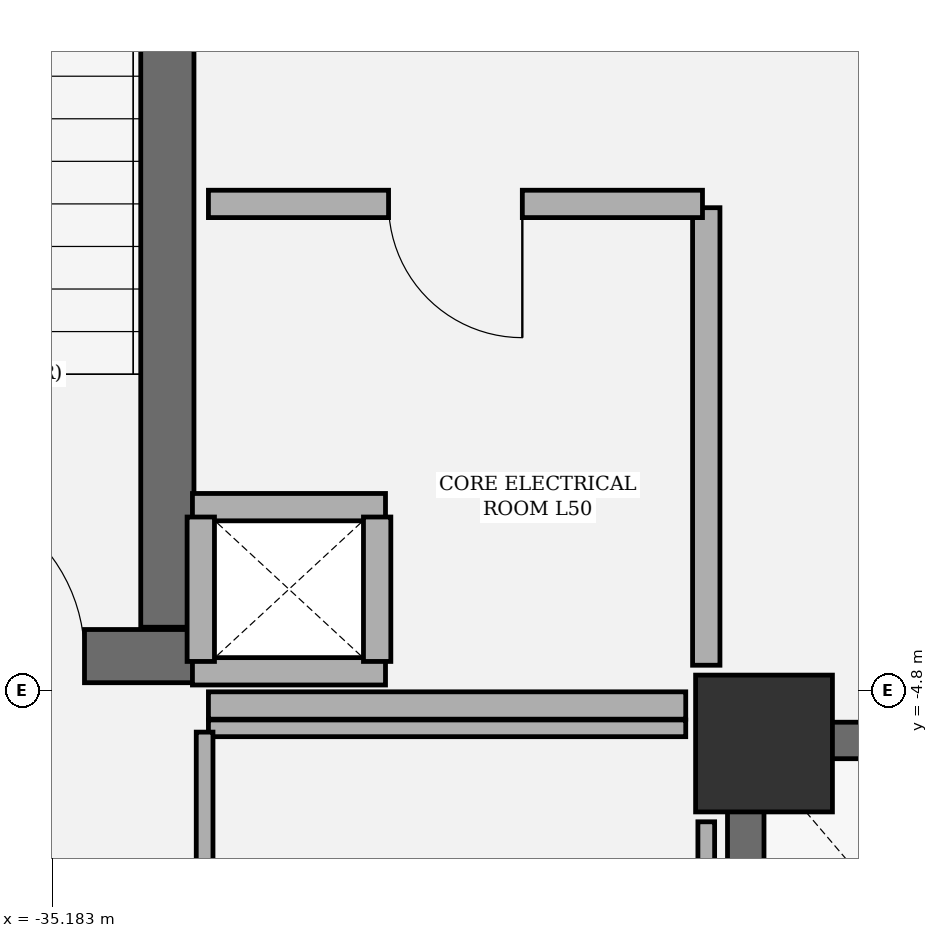
"""IFC4 building model, lengths in metres.
Left out: names, types, materials, properties, quantities, classifications, styles, units other than length and angle.
Written with IfcOpenShell. Run it as: python <this file> out.ifc"""

import sys

from ifc_helpers import new_model, si_unit, direction, frame, frame_2d, origin, origin_2d, place, context, subcontext, project, spatial, rectangle, extrude, element, fill, save


model = new_model("IFC4")
c1 = context("Model", 3, precision=1e-05, world=origin(), true_north=direction((0.0, 1.0)))
c2 = subcontext(c1, "Body", "Model", "MODEL_VIEW")
j1 = project(units=[si_unit("LENGTHUNIT", "METRE"), si_unit("PLANEANGLEUNIT", "RADIAN")], contexts=[c1])
p1 = place(None, origin())
s1 = spatial("IfcSite", under=j1, at=p1, CompositionType="ELEMENT")
p2 = place(p1, origin())
s2 = spatial("IfcBuilding", under=s1, at=p2, CompositionType="ELEMENT")
p3 = place(p2, frame((0.0, 0.0, 217.2)))
s3 = spatial("IfcBuildingStorey", under=s2, at=p3, CompositionType="ELEMENT", Elevation=217.2)
p4 = place(p3, frame((-30.5, -5.15, 0.0), z_axis=(0.0, 0.0, 1.0), x_axis=(1.0, 0.0, 0.0)))
e1 = element("IfcColumn", 1, at=p4, inside=s3, PredefinedType="COLUMN", context=c2, shape_type="SweptSolid", body=[
    extrude(rectangle(XDim=0.9, YDim=0.9, at=origin_2d()), origin(), (0.0, 0.0, 1.0), 4.05),
])
p5 = place(p3, frame((-38.46, -4.575, 0.0), z_axis=(0.0, 0.0, 1.0), x_axis=(1.0, 0.0, 0.0)))
e2 = element("IfcWall", 2, at=p5, inside=s3, PredefinedType="SHEAR", context=c2, shape_type="SweptSolid", body=[
    extrude(rectangle(XDim=4.21, YDim=0.35, at=frame_2d((2.105, 0.0))), origin(), (0.0, 0.0, 1.0), 3.78),
])
p6 = place(p5, frame((2.39, 0.0, 0.0)))
e3 = element("IfcOpeningElement", 3, at=p6, cuts=e2, PredefinedType="OPENING", context=c2, shape_type="SweptSolid", body=[
    extrude(rectangle(XDim=1.1, YDim=2.2, at=frame_2d((0.55, 1.1))), frame((0.0, 0.185, 0.0), z_axis=(0.0, -1.0, 0.0), x_axis=(1.0, 0.0, 0.0)), (0.0, 0.0, 1.0), 0.37),
])
p7 = place(p3, frame((-34.425, -4.385, 0.0), z_axis=(0.0, 0.0, 1.0), x_axis=(0.0, 1.0, 0.0)))
e4 = element("IfcWall", 4, at=p7, inside=s3, PredefinedType="SHEAR", context=c2, shape_type="SweptSolid", body=[
    extrude(rectangle(XDim=8.77, YDim=0.35, at=frame_2d((4.385, 0.0))), origin(), (0.0, 0.0, 1.0), 3.78),
])
p8 = place(p3, frame((-30.74, -5.13, 0.0), z_axis=(0.0, 0.0, 1.0), x_axis=(1.0, 0.0, 0.0)))
e5 = element("IfcWall", 5, at=p8, inside=s3, PredefinedType="SHEAR", context=c2, shape_type="SweptSolid", body=[
    extrude(rectangle(XDim=2.48, YDim=0.24, at=frame_2d((1.24, 0.0))), origin(), (0.0, 0.0, 1.0), 3.78),
])
p9 = place(p3, frame((-30.62, -7.638, 0.0), z_axis=(0.0, 0.0, 1.0), x_axis=(0.0, 1.0, 0.0)))
e6 = element("IfcWall", 6, at=p9, inside=s3, PredefinedType="SHEAR", context=c2, shape_type="SweptSolid", body=[
    extrude(rectangle(XDim=2.376, YDim=0.24, at=frame_2d((1.188, 0.0))), origin(), (0.0, 0.0, 1.0), 3.78),
])
for number, where, z_axis, x_axis in (
    (7, (-32.99, -4.675, 0.0), (0.0, 0.0, 1.0), (-1.0, 0.0, 0.0)),
    (8, (-34.26, -3.595, 0.0), (0.0, 0.0, 1.0), (1.0, 0.0, 0.0)),
):
    element("IfcWall", number, at=place(p3, frame(where, z_axis=z_axis, x_axis=x_axis)), inside=s3, PredefinedType="PARTITIONING", context=c2, shape_type="SweptSolid", body=[
        extrude(rectangle(XDim=1.27, YDim=0.18, at=frame_2d((0.635, 0.0))), origin(), (0.0, 0.0, 1.0), 3.78),
    ])
for number, where, z_axis, x_axis in (
    (9, (-34.205, -4.61, 0.0), (0.0, 0.0, 1.0), (0.0, 1.0, 0.0)),
    (10, (-33.045, -3.66, 0.0), (0.0, 0.0, 1.0), (0.0, -1.0, 0.0)),
):
    element("IfcWall", number, at=place(p3, frame(where, z_axis=z_axis, x_axis=x_axis)), inside=s3, PredefinedType="PARTITIONING", context=c2, shape_type="SweptSolid", body=[
        extrude(rectangle(XDim=0.95, YDim=0.18, at=frame_2d((0.475, 0.0))), origin(), (0.0, 0.0, 1.0), 3.78),
    ])
p10 = place(p3, frame((-30.88, -7.743, 0.0), z_axis=(0.0, 0.0, 1.0), x_axis=(0.0, 1.0, 0.0)))
e11 = element("IfcWall", 11, at=p10, inside=s3, PredefinedType="PARTITIONING", context=c2, shape_type="SweptSolid", body=[
    extrude(rectangle(XDim=2.078, YDim=0.11, at=frame_2d((1.039, 0.0))), origin(), (0.0, 0.0, 1.0), 3.78),
])
p11 = place(p3, frame((-31.015, -5.05, 0.0), z_axis=(0.0, 0.0, 1.0), x_axis=(-1.0, 0.0, 0.0)))
e12 = element("IfcWall", 12, at=p11, inside=s3, PredefinedType="PARTITIONING", context=c2, shape_type="SweptSolid", body=[
    extrude(rectangle(XDim=3.14, YDim=0.11, at=frame_2d((1.57, 0.0))), origin(), (0.0, 0.0, 1.0), 3.78),
])
p12 = place(p3, frame((-34.18, -5.075, 0.0), z_axis=(0.0, 0.0, 1.0), x_axis=(0.0, -1.0, 0.0)))
e13 = element("IfcWall", 13, at=p12, inside=s3, PredefinedType="PARTITIONING", context=c2, shape_type="SweptSolid", body=[
    extrude(rectangle(XDim=3.25, YDim=0.11, at=frame_2d((1.625, 0.0))), origin(), (0.0, 0.0, 1.0), 3.78),
])
p13 = place(p12, frame((1.185, 0.0, 0.0)))
e14 = element("IfcOpeningElement", 14, at=p13, cuts=e13, PredefinedType="OPENING", context=c2, shape_type="SweptSolid", body=[
    extrude(rectangle(XDim=0.88, YDim=2.1, at=frame_2d((0.44, 1.05))), frame((0.0, 0.065, 0.0), z_axis=(0.0, -1.0, 0.0), x_axis=(1.0, 0.0, 0.0)), (0.0, 0.0, 1.0), 0.13),
])
p14 = place(p3, frame((-34.155, -4.9, 0.0), z_axis=(0.0, 0.0, 1.0), x_axis=(1.0, 0.0, 0.0)))
e15 = element("IfcWall", 15, at=p14, inside=s3, PredefinedType="PARTITIONING", context=c2, shape_type="SweptSolid", body=[
    extrude(rectangle(XDim=3.14, YDim=0.18, at=frame_2d((1.57, 0.0))), origin(), (0.0, 0.0, 1.0), 3.78),
])
p15 = place(p3, frame((-30.88, -4.635, 0.0), z_axis=(0.0, 0.0, 1.0), x_axis=(0.0, 1.0, 0.0)))
e16 = element("IfcWall", 16, at=p15, inside=s3, PredefinedType="PARTITIONING", context=c2, shape_type="SweptSolid", body=[
    extrude(rectangle(XDim=3.01, YDim=0.18, at=frame_2d((1.505, 0.0))), origin(), (0.0, 0.0, 1.0), 3.78),
])
p16 = place(p3, frame((-30.905, -1.6, 0.0), z_axis=(0.0, 0.0, 1.0), x_axis=(-1.0, 0.0, 0.0)))
e17 = element("IfcWall", 17, at=p16, inside=s3, PredefinedType="PARTITIONING", context=c2, shape_type="SweptSolid", body=[
    extrude(rectangle(XDim=3.25, YDim=0.18, at=frame_2d((1.625, 0.0))), origin(), (0.0, 0.0, 1.0), 3.78),
])
p17 = place(p16, frame((1.185, 0.0, 0.0)))
e18 = element("IfcOpeningElement", 18, at=p17, cuts=e17, PredefinedType="OPENING", context=c2, shape_type="SweptSolid", body=[
    extrude(rectangle(XDim=0.88, YDim=2.1, at=frame_2d((0.44, 1.05))), frame((0.0, 0.1, 0.0), z_axis=(0.0, -1.0, 0.0), x_axis=(1.0, 0.0, 0.0)), (0.0, 0.0, 1.0), 0.2),
])
p18 = place(p6, origin())
e19 = element("IfcDoor", 19, at=p18, inside=s3, OperationType="SINGLE_SWING_LEFT", PredefinedType="DOOR", context=c2, shape_type="SweptSolid", body=[
    extrude(rectangle(XDim=1.1, YDim=2.2, at=frame_2d((0.55, 1.1))), frame((0.0, 0.025, 0.0), z_axis=(0.0, -1.0, 0.0), x_axis=(1.0, 0.0, 0.0)), (0.0, 0.0, 1.0), 0.05),
])
fill(e3, e19)
p19 = place(p17, origin())
e20 = element("IfcDoor", 20, at=p19, inside=s3, OperationType="SINGLE_SWING_LEFT", PredefinedType="DOOR", context=c2, shape_type="SweptSolid", body=[
    extrude(rectangle(XDim=0.88, YDim=2.1, at=frame_2d((0.44, 1.05))), frame((0.0, 0.025, 0.0), z_axis=(0.0, -1.0, 0.0), x_axis=(1.0, 0.0, 0.0)), (0.0, 0.0, 1.0), 0.05),
])
fill(e18, e20)
save(model, sys.argv[1])
